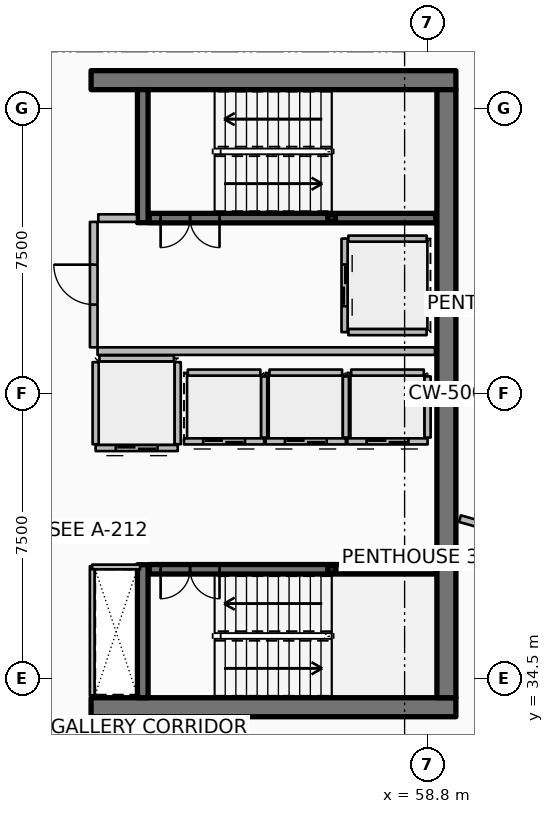
"""IFC4 building model, lengths in metres.
Left out: names, types, materials, properties, quantities, classifications, styles, units other than length and angle.
Written with IfcOpenShell. Run it as: python <this file> out.ifc"""

import sys

from ifc_helpers import new_model, si_unit, direction, frame, frame_2d, origin, origin_2d, place, context, subcontext, project, spatial, rectangle, hollow_rectangle, extrude, element, fill, save


model = new_model("IFC4")
c1 = context("Model", 3, precision=1e-05, world=origin(), true_north=direction((0.0, 1.0)))
c2 = subcontext(c1, "Body", "Model", "MODEL_VIEW")
j1 = project(units=[si_unit("LENGTHUNIT", "METRE"), si_unit("PLANEANGLEUNIT", "RADIAN")], contexts=[c1])
p1 = place(None, origin())
s1 = spatial("IfcSite", under=j1, at=p1, CompositionType="ELEMENT")
p2 = place(p1, origin())
s2 = spatial("IfcBuilding", under=s1, at=p2, CompositionType="ELEMENT")
p3 = place(p2, frame((0.0, 0.0, 334.7)))
s3 = spatial("IfcBuildingStorey", under=s2, at=p3, CompositionType="ELEMENT", Elevation=334.7)
for number, where, z_axis, x_axis in (
    (1, (49.95, 33.75, 0.0), (0.0, 0.0, 1.0), (1.0, 0.0, 0.0)),
    (2, (49.95, 50.25, 0.0), (0.0, 0.0, 1.0), (1.0, 0.0, 0.0)),
):
    element("IfcWall", number, at=place(p3, frame(where, z_axis=z_axis, x_axis=x_axis)), inside=s3, PredefinedType="SHEAR", context=c2, shape_type="SweptSolid", body=[
        extrude(rectangle(XDim=9.6, YDim=0.5, at=frame_2d((4.8, 0.0))), origin(), (0.0, 0.0, 1.0), 4.2),
    ])
p4 = place(p3, frame((59.3, 34.0, 0.0), z_axis=(0.0, 0.0, 1.0), x_axis=(0.0, 1.0, 0.0)))
e3 = element("IfcWall", 3, at=p4, inside=s3, PredefinedType="SHEAR", context=c2, shape_type="SweptSolid", body=[
    extrude(rectangle(XDim=16.0, YDim=0.5, at=frame_2d((8.0, 0.0))), origin(), (0.0, 0.0, 1.0), 4.2),
])
for number, where, z_axis, x_axis in (
    (4, (51.31, 46.5, 0.0), (0.0, 0.0, 1.0), (0.0, 1.0, 0.0)),
    (5, (51.31, 34.0, 0.0), (0.0, 0.0, 1.0), (0.0, 1.0, 0.0)),
):
    element("IfcWall", number, at=place(p3, frame(where, z_axis=z_axis, x_axis=x_axis)), inside=s3, PredefinedType="SHEAR", context=c2, shape_type="SweptSolid", body=[
        extrude(rectangle(XDim=3.5, YDim=0.28, at=frame_2d((1.75, 0.0))), origin(), (0.0, 0.0, 1.0), 4.2),
    ])
for number, where, z_axis, x_axis in (
    (6, (56.28, 46.62, 0.0), (0.0, 0.0, 1.0), (1.0, 0.0, 0.0)),
    (7, (56.28, 37.38, 0.0), (0.0, 0.0, 1.0), (1.0, 0.0, 0.0)),
):
    element("IfcColumn", number, at=place(p3, frame(where, z_axis=z_axis, x_axis=x_axis)), inside=s3, PredefinedType="COLUMN", context=c2, shape_type="SweptSolid", body=[
        extrude(hollow_rectangle(XDim=0.2, YDim=0.2, WallThickness=0.01, InnerFilletRadius=0.01, OuterFilletRadius=0.02, at=origin_2d()), origin(), (0.0, 0.0, 1.0), 1.895),
    ])
p5 = place(p3, frame((51.48, 46.62, 0.0), z_axis=(0.0, 0.0, 1.0), x_axis=(1.0, 0.0, 0.0)))
e8 = element("IfcWall", 8, at=p5, inside=s3, PredefinedType="SOLIDWALL", context=c2, shape_type="SweptSolid", body=[
    extrude(rectangle(XDim=7.54, YDim=0.25, at=frame_2d((3.77, 0.0))), origin(), (0.0, 0.0, 1.0), 3.94),
])
p6 = place(p5, frame((0.3, 0.0, 0.0)))
e9 = element("IfcOpeningElement", 9, at=p6, cuts=e8, PredefinedType="OPENING", context=c2, shape_type="SweptSolid", body=[
    extrude(rectangle(XDim=1.55, YDim=2.15, at=frame_2d((0.775, 1.075))), frame((0.0, 0.135, 0.0), z_axis=(0.0, -1.0, 0.0), x_axis=(1.0, 0.0, 0.0)), (0.0, 0.0, 1.0), 0.27),
])
p7 = place(p3, frame((51.48, 37.38, 0.0), z_axis=(0.0, 0.0, 1.0), x_axis=(1.0, 0.0, 0.0)))
e10 = element("IfcWall", 10, at=p7, inside=s3, PredefinedType="SOLIDWALL", context=c2, shape_type="SweptSolid", body=[
    extrude(rectangle(XDim=7.54, YDim=0.25, at=frame_2d((3.77, 0.0))), origin(), (0.0, 0.0, 1.0), 3.94),
])
p8 = place(p7, frame((0.3, 0.0, 0.0)))
e11 = element("IfcOpeningElement", 11, at=p8, cuts=e10, PredefinedType="OPENING", context=c2, shape_type="SweptSolid", body=[
    extrude(rectangle(XDim=1.55, YDim=2.15, at=frame_2d((0.775, 1.075))), frame((0.0, 0.135, 0.0), z_axis=(0.0, -1.0, 0.0), x_axis=(1.0, 0.0, 0.0)), (0.0, 0.0, 1.0), 0.27),
])
p9 = place(p3, frame((54.505, 40.745, 0.0), z_axis=(0.0, 0.0, 1.0), x_axis=(-1.0, 0.0, 0.0)))
e12 = element("IfcWall", 12, at=p9, inside=s3, PredefinedType="PARTITIONING", context=c2, shape_type="SweptSolid", body=[
    extrude(rectangle(XDim=2.11, YDim=0.16, at=frame_2d((1.055, 0.0))), origin(), (0.0, 0.0, 1.0), 3.94),
])
p10 = place(p9, frame((0.505, 0.0, 0.0)))
e13 = element("IfcOpeningElement", 13, at=p10, cuts=e12, PredefinedType="OPENING", context=c2, shape_type="SweptSolid", body=[
    extrude(rectangle(XDim=1.1, YDim=2.1, at=frame_2d((0.55, 1.05))), frame((0.0, 0.09, 0.0), z_axis=(0.0, -1.0, 0.0), x_axis=(1.0, 0.0, 0.0)), (0.0, 0.0, 1.0), 0.18),
])
p11 = place(p3, frame((54.505, 40.845, 0.0), z_axis=(0.0, 0.0, 1.0), x_axis=(0.0, 1.0, 0.0)))
e14 = element("IfcWall", 14, at=p11, inside=s3, PredefinedType="PARTITIONING", context=c2, shape_type="SweptSolid", body=[
    extrude(rectangle(XDim=1.61, YDim=0.16, at=frame_2d((0.805, 0.0))), origin(), (0.0, 0.0, 1.0), 3.94),
])
p12 = place(p3, frame((52.495, 42.555, 0.0), z_axis=(0.0, 0.0, 1.0), x_axis=(1.0, 0.0, 0.0)))
e15 = element("IfcWall", 15, at=p12, inside=s3, PredefinedType="PARTITIONING", context=c2, shape_type="SweptSolid", body=[
    extrude(rectangle(XDim=1.91, YDim=0.16, at=frame_2d((0.955, 0.0))), origin(), (0.0, 0.0, 1.0), 3.94),
])
p13 = place(p3, frame((56.655, 40.745, 0.0), z_axis=(0.0, 0.0, 1.0), x_axis=(-1.0, 0.0, 0.0)))
e16 = element("IfcWall", 16, at=p13, inside=s3, PredefinedType="PARTITIONING", context=c2, shape_type="SweptSolid", body=[
    extrude(rectangle(XDim=2.11, YDim=0.16, at=frame_2d((1.055, 0.0))), origin(), (0.0, 0.0, 1.0), 3.94),
])
p14 = place(p13, frame((0.505, 0.0, 0.0)))
e17 = element("IfcOpeningElement", 17, at=p14, cuts=e16, PredefinedType="OPENING", context=c2, shape_type="SweptSolid", body=[
    extrude(rectangle(XDim=1.1, YDim=2.1, at=frame_2d((0.55, 1.05))), frame((0.0, 0.09, 0.0), z_axis=(0.0, -1.0, 0.0), x_axis=(1.0, 0.0, 0.0)), (0.0, 0.0, 1.0), 0.18),
])
p15 = place(p3, frame((56.655, 40.845, 0.0), z_axis=(0.0, 0.0, 1.0), x_axis=(0.0, 1.0, 0.0)))
e18 = element("IfcWall", 18, at=p15, inside=s3, PredefinedType="PARTITIONING", context=c2, shape_type="SweptSolid", body=[
    extrude(rectangle(XDim=1.61, YDim=0.16, at=frame_2d((0.805, 0.0))), origin(), (0.0, 0.0, 1.0), 3.94),
])
p16 = place(p3, frame((54.645, 42.555, 0.0), z_axis=(0.0, 0.0, 1.0), x_axis=(1.0, 0.0, 0.0)))
e19 = element("IfcWall", 19, at=p16, inside=s3, PredefinedType="PARTITIONING", context=c2, shape_type="SweptSolid", body=[
    extrude(rectangle(XDim=1.91, YDim=0.16, at=frame_2d((0.955, 0.0))), origin(), (0.0, 0.0, 1.0), 3.94),
])
p17 = place(p3, frame((58.805, 40.745, 0.0), z_axis=(0.0, 0.0, 1.0), x_axis=(-1.0, 0.0, 0.0)))
e20 = element("IfcWall", 20, at=p17, inside=s3, PredefinedType="PARTITIONING", context=c2, shape_type="SweptSolid", body=[
    extrude(rectangle(XDim=2.11, YDim=0.16, at=frame_2d((1.055, 0.0))), origin(), (0.0, 0.0, 1.0), 3.94),
])
p18 = place(p17, frame((0.505, 0.0, 0.0)))
e21 = element("IfcOpeningElement", 21, at=p18, cuts=e20, PredefinedType="OPENING", context=c2, shape_type="SweptSolid", body=[
    extrude(rectangle(XDim=1.1, YDim=2.1, at=frame_2d((0.55, 1.05))), frame((0.0, 0.09, 0.0), z_axis=(0.0, -1.0, 0.0), x_axis=(1.0, 0.0, 0.0)), (0.0, 0.0, 1.0), 0.18),
])
p19 = place(p3, frame((58.805, 40.845, 0.0), z_axis=(0.0, 0.0, 1.0), x_axis=(0.0, 1.0, 0.0)))
e22 = element("IfcWall", 22, at=p19, inside=s3, PredefinedType="PARTITIONING", context=c2, shape_type="SweptSolid", body=[
    extrude(rectangle(XDim=1.61, YDim=0.16, at=frame_2d((0.805, 0.0))), origin(), (0.0, 0.0, 1.0), 3.94),
])
p20 = place(p3, frame((56.795, 42.555, 0.0), z_axis=(0.0, 0.0, 1.0), x_axis=(1.0, 0.0, 0.0)))
e23 = element("IfcWall", 23, at=p20, inside=s3, PredefinedType="PARTITIONING", context=c2, shape_type="SweptSolid", body=[
    extrude(rectangle(XDim=1.91, YDim=0.16, at=frame_2d((0.955, 0.0))), origin(), (0.0, 0.0, 1.0), 3.94),
])
p21 = place(p3, frame((56.62, 46.08, 0.0), z_axis=(0.0, 0.0, 1.0), x_axis=(0.0, -1.0, 0.0)))
e24 = element("IfcWall", 24, at=p21, inside=s3, PredefinedType="PARTITIONING", context=c2, shape_type="SweptSolid", body=[
    extrude(rectangle(XDim=2.46, YDim=0.16, at=frame_2d((1.23, 0.0))), origin(), (0.0, 0.0, 1.0), 3.94),
])
p22 = place(p21, frame((0.68, 0.0, 0.0)))
e25 = element("IfcOpeningElement", 25, at=p22, cuts=e24, PredefinedType="OPENING", context=c2, shape_type="SweptSolid", body=[
    extrude(rectangle(XDim=1.1, YDim=2.1, at=frame_2d((0.55, 1.05))), frame((0.0, 0.09, 0.0), z_axis=(0.0, -1.0, 0.0), x_axis=(1.0, 0.0, 0.0)), (0.0, 0.0, 1.0), 0.18),
])
for number, where, z_axis, x_axis in (
    (26, (56.72, 46.08, 0.0), (0.0, 0.0, 1.0), (1.0, 0.0, 0.0)),
    (27, (56.72, 43.62, 0.0), (0.0, 0.0, 1.0), (1.0, 0.0, 0.0)),
):
    element("IfcWall", number, at=place(p3, frame(where, z_axis=z_axis, x_axis=x_axis)), inside=s3, PredefinedType="PARTITIONING", context=c2, shape_type="SweptSolid", body=[
        extrude(rectangle(XDim=2.06, YDim=0.16, at=frame_2d((1.03, 0.0))), origin(), (0.0, 0.0, 1.0), 3.94),
    ])
p23 = place(p3, frame((52.23, 40.57, 0.0), z_axis=(0.0, 0.0, 1.0), x_axis=(-1.0, 0.0, 0.0)))
e28 = element("IfcWall", 28, at=p23, inside=s3, PredefinedType="PARTITIONING", context=c2, shape_type="SweptSolid", body=[
    extrude(rectangle(XDim=2.16, YDim=0.16, at=frame_2d((1.08, 0.0))), origin(), (0.0, 0.0, 1.0), 3.94),
])
p24 = place(p23, frame((0.53, 0.0, 0.0)))
e29 = element("IfcOpeningElement", 29, at=p24, cuts=e28, PredefinedType="OPENING", context=c2, shape_type="SweptSolid", body=[
    extrude(rectangle(XDim=1.1, YDim=2.1, at=frame_2d((0.55, 1.05))), frame((0.0, 0.09, 0.0), z_axis=(0.0, -1.0, 0.0), x_axis=(1.0, 0.0, 0.0)), (0.0, 0.0, 1.0), 0.18),
])
for number, where, z_axis, x_axis in (
    (30, (52.23, 40.67, 0.0), (0.0, 0.0, 1.0), (0.0, 1.0, 0.0)),
    (31, (50.07, 40.67, 0.0), (0.0, 0.0, 1.0), (0.0, 1.0, 0.0)),
):
    element("IfcWall", number, at=place(p3, frame(where, z_axis=z_axis, x_axis=x_axis)), inside=s3, PredefinedType="PARTITIONING", context=c2, shape_type="SweptSolid", body=[
        extrude(rectangle(XDim=2.16, YDim=0.16, at=frame_2d((1.08, 0.0))), origin(), (0.0, 0.0, 1.0), 3.94),
    ])
p25 = place(p3, frame((50.17, 42.93, 0.0), z_axis=(0.0, 0.0, 1.0), x_axis=(1.0, 0.0, 0.0)))
e32 = element("IfcWall", 32, at=p25, inside=s3, PredefinedType="PARTITIONING", context=c2, shape_type="SweptSolid", body=[
    extrude(rectangle(XDim=1.96, YDim=0.16, at=frame_2d((0.98, 0.0))), origin(), (0.0, 0.0, 1.0), 3.94),
])
p26 = place(p3, frame((50.12, 43.12, 0.0), z_axis=(0.0, 0.0, 1.0), x_axis=(1.0, 0.0, 0.0)))
e33 = element("IfcWall", 33, at=p26, inside=s3, PredefinedType="PARTITIONING", context=c2, shape_type="SweptSolid", body=[
    extrude(rectangle(XDim=8.88, YDim=0.2, at=frame_2d((4.44, 0.0))), origin(), (0.0, 0.0, 1.0), 3.94),
])
p27 = place(p3, frame((50.14, 46.62, 0.0), z_axis=(0.0, 0.0, 1.0), x_axis=(1.0, 0.0, 0.0)))
e34 = element("IfcWall", 34, at=p27, inside=s3, PredefinedType="PARTITIONING", context=c2, shape_type="SweptSolid", body=[
    extrude(rectangle(XDim=1.02, YDim=0.2, at=frame_2d((0.51, 0.0))), origin(), (0.0, 0.0, 1.0), 3.94),
])
p28 = place(p3, frame((50.02, 43.22, 0.0), z_axis=(0.0, 0.0, 1.0), x_axis=(0.0, 1.0, 0.0)))
e35 = element("IfcWall", 35, at=p28, inside=s3, PredefinedType="PARTITIONING", context=c2, shape_type="SweptSolid", body=[
    extrude(rectangle(XDim=3.3, YDim=0.2, at=frame_2d((1.65, 0.0))), origin(), (0.0, 0.0, 1.0), 3.94),
])
p29 = place(p28, frame((1.125, 0.0, 0.0)))
e36 = element("IfcOpeningElement", 36, at=p29, cuts=e35, PredefinedType="OPENING", context=c2, shape_type="SweptSolid", body=[
    extrude(rectangle(XDim=1.05, YDim=2.1, at=frame_2d((0.525, 1.05))), frame((0.0, 0.11, 0.0), z_axis=(0.0, -1.0, 0.0), x_axis=(1.0, 0.0, 0.0)), (0.0, 0.0, 1.0), 0.22),
])
p30 = place(p3, frame((49.98, 34.06, 0.0), z_axis=(0.0, 0.0, 1.0), x_axis=(0.0, 1.0, 0.0)))
e37 = element("IfcWall", 37, at=p30, inside=s3, PredefinedType="PARTITIONING", context=c2, shape_type="SweptSolid", body=[
    extrude(rectangle(XDim=3.4, YDim=0.125, at=frame_2d((1.7, 0.0))), origin(), (0.0, 0.0, 1.0), 3.38),
])
p31 = place(p3, frame((49.98, 37.44, 0.0), z_axis=(0.0, 0.0, 1.0), x_axis=(1.0, 0.0, 0.0)))
e38 = element("IfcWall", 38, at=p31, inside=s3, PredefinedType="PARTITIONING", context=c2, shape_type="SweptSolid", body=[
    extrude(rectangle(XDim=1.26, YDim=0.125, at=frame_2d((0.63, 0.0))), origin(), (0.0, 0.0, 1.0), 3.38),
])
p32 = place(p3, frame((59.656, 38.713, 0.0), z_axis=(0.0, 0.0, 1.0), x_axis=(0.962457020055, -0.271434125613, 0.0)))
e39 = element("IfcWall", 39, at=p32, inside=s3, PredefinedType="PARTITIONING", context=c2, shape_type="SweptSolid", body=[
    extrude(rectangle(XDim=12.916, YDim=0.18, at=frame_2d((6.458, 0.0))), origin(), (0.0, 0.0, 1.0), 3.38),
])
p33 = place(p6, origin())
e40 = element("IfcDoor", 40, at=p33, inside=s3, OperationType="DOUBLE_DOOR_SINGLE_SWING", PredefinedType="DOOR", context=c2, shape_type="SweptSolid", body=[
    extrude(rectangle(XDim=1.55, YDim=2.15, at=frame_2d((0.775, 1.075))), frame((0.0, 0.025, 0.0), z_axis=(0.0, -1.0, 0.0), x_axis=(1.0, 0.0, 0.0)), (0.0, 0.0, 1.0), 0.05),
])
fill(e9, e40)
p34 = place(p8, origin())
e41 = element("IfcDoor", 41, at=p34, inside=s3, OperationType="DOUBLE_DOOR_SINGLE_SWING", PredefinedType="DOOR", context=c2, shape_type="SweptSolid", body=[
    extrude(rectangle(XDim=1.55, YDim=2.15, at=frame_2d((0.775, 1.075))), frame((0.0, 0.025, 0.0), z_axis=(0.0, -1.0, 0.0), x_axis=(1.0, 0.0, 0.0)), (0.0, 0.0, 1.0), 0.05),
])
fill(e11, e41)
p35 = place(p10, origin())
e42 = element("IfcDoor", 42, at=p35, inside=s3, OperationType="DOUBLE_DOOR_SLIDING", PredefinedType="DOOR", context=c2, shape_type="SweptSolid", body=[
    extrude(rectangle(XDim=1.1, YDim=2.1, at=frame_2d((0.55, 1.05))), frame((0.0, 0.025, 0.0), z_axis=(0.0, -1.0, 0.0), x_axis=(1.0, 0.0, 0.0)), (0.0, 0.0, 1.0), 0.05),
])
fill(e13, e42)
p36 = place(p14, origin())
e43 = element("IfcDoor", 43, at=p36, inside=s3, OperationType="DOUBLE_DOOR_SLIDING", PredefinedType="DOOR", context=c2, shape_type="SweptSolid", body=[
    extrude(rectangle(XDim=1.1, YDim=2.1, at=frame_2d((0.55, 1.05))), frame((0.0, 0.025, 0.0), z_axis=(0.0, -1.0, 0.0), x_axis=(1.0, 0.0, 0.0)), (0.0, 0.0, 1.0), 0.05),
])
fill(e17, e43)
p37 = place(p18, origin())
e44 = element("IfcDoor", 44, at=p37, inside=s3, OperationType="DOUBLE_DOOR_SLIDING", PredefinedType="DOOR", context=c2, shape_type="SweptSolid", body=[
    extrude(rectangle(XDim=1.1, YDim=2.1, at=frame_2d((0.55, 1.05))), frame((0.0, 0.025, 0.0), z_axis=(0.0, -1.0, 0.0), x_axis=(1.0, 0.0, 0.0)), (0.0, 0.0, 1.0), 0.05),
])
fill(e21, e44)
p38 = place(p22, origin())
e45 = element("IfcDoor", 45, at=p38, inside=s3, OperationType="DOUBLE_DOOR_SLIDING", PredefinedType="DOOR", context=c2, shape_type="SweptSolid", body=[
    extrude(rectangle(XDim=1.1, YDim=2.1, at=frame_2d((0.55, 1.05))), frame((0.0, 0.025, 0.0), z_axis=(0.0, -1.0, 0.0), x_axis=(1.0, 0.0, 0.0)), (0.0, 0.0, 1.0), 0.05),
])
fill(e25, e45)
p39 = place(p24, origin())
e46 = element("IfcDoor", 46, at=p39, inside=s3, OperationType="DOUBLE_DOOR_SLIDING", PredefinedType="DOOR", context=c2, shape_type="SweptSolid", body=[
    extrude(rectangle(XDim=1.1, YDim=2.1, at=frame_2d((0.55, 1.05))), frame((0.0, 0.025, 0.0), z_axis=(0.0, -1.0, 0.0), x_axis=(1.0, 0.0, 0.0)), (0.0, 0.0, 1.0), 0.05),
])
fill(e29, e46)
p40 = place(p29, origin())
e47 = element("IfcDoor", 47, at=p40, inside=s3, OperationType="SINGLE_SWING_RIGHT", PredefinedType="DOOR", context=c2, shape_type="SweptSolid", body=[
    extrude(rectangle(XDim=1.05, YDim=2.1, at=frame_2d((0.525, 1.05))), frame((0.0, 0.025, 0.0), z_axis=(0.0, -1.0, 0.0), x_axis=(1.0, 0.0, 0.0)), (0.0, 0.0, 1.0), 0.05),
])
fill(e36, e47)
save(model, sys.argv[1])
